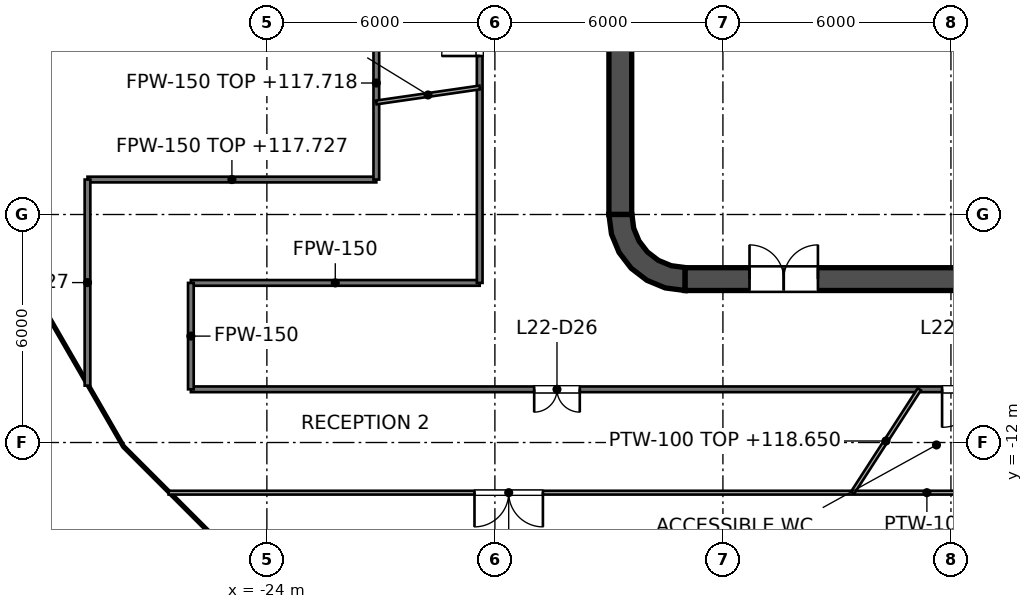
"""IFC4 building model, lengths in metres.
Left out: names, types, materials, properties, quantities, classifications, styles, units other than length and angle.
Written with IfcOpenShell. Run it as: python <this file> out.ifc"""

import sys

from ifc_helpers import new_model, si_unit, direction, frame, frame_2d, origin, place, context, subcontext, project, spatial, polyline, rectangle, outline, extrude, element, fill, save


model = new_model("IFC4")
c1 = context("Model", 3, precision=1e-05, world=origin(), true_north=direction((0.0, 1.0)))
c2 = subcontext(c1, "Body", "Model", "MODEL_VIEW")
j1 = project(units=[si_unit("LENGTHUNIT", "METRE"), si_unit("PLANEANGLEUNIT", "RADIAN")], contexts=[c1])
p1 = place(None, origin())
s1 = spatial("IfcSite", under=j1, at=p1, CompositionType="ELEMENT")
p2 = place(p1, origin())
s2 = spatial("IfcBuilding", under=s1, at=p2, CompositionType="ELEMENT")
p3 = place(p2, frame((0.0, 0.0, 114.6)))
s3 = spatial("IfcBuildingStorey", under=s2, at=p3, CompositionType="ELEMENT", Elevation=114.6)
p4 = place(p3, frame((-13.0, -7.7, 0.0), z_axis=(0.0, 0.0, 1.0), x_axis=(1.0, 0.0, 0.0)))
e1 = element("IfcWall", 1, at=p4, inside=s3, PredefinedType="SHEAR", context=c2, shape_type="SweptSolid", body=[
    extrude(rectangle(XDim=26.0, YDim=0.6, at=frame_2d((13.0, 0.0))), origin(), (0.0, 0.0, 1.0), 4.2),
])
p5 = place(p4, frame((1.7, 0.0, 0.0)))
e2 = element("IfcOpeningElement", 2, at=p5, cuts=e1, PredefinedType="OPENING", context=c2, shape_type="SweptSolid", body=[
    extrude(rectangle(XDim=1.8, YDim=2.1, at=frame_2d((0.9, 1.05))), frame((0.0, 0.3, 0.0), z_axis=(0.0, -1.0, 0.0), x_axis=(1.0, 0.0, 0.0)), (0.0, 0.0, 1.0), 0.6),
])
p6 = place(p4, frame((22.5, 0.0, 0.0)))
e3 = element("IfcOpeningElement", 3, at=p6, cuts=e1, PredefinedType="OPENING", context=c2, shape_type="SweptSolid", body=[
    extrude(rectangle(XDim=1.8, YDim=2.1, at=frame_2d((0.9, 1.05))), frame((0.0, 0.3, 0.0), z_axis=(0.0, -1.0, 0.0), x_axis=(1.0, 0.0, 0.0)), (0.0, 0.0, 1.0), 0.6),
])
p7 = place(p3, frame((-14.7, -6.0, 0.0), z_axis=(0.0, 0.0, 1.0), x_axis=(0.0, 1.0, 0.0)))
e4 = element("IfcWall", 4, at=p7, inside=s3, PredefinedType="SHEAR", context=c2, shape_type="SweptSolid", body=[
    extrude(rectangle(XDim=12.0, YDim=0.6, at=frame_2d((6.0, 0.0))), origin(), (0.0, 0.0, 1.0), 4.2),
])
p8 = place(p3, origin())
e5 = element("IfcWall", 5, at=p8, inside=s3, PredefinedType="SHEAR", context=c2, shape_type="SweptSolid", body=[
    extrude(outline(polyline([(-13.0, -8.0), (-13.0, -7.395), (-13.361, -7.347), (-13.698, -7.208), (-13.986, -6.986), (-14.208, -6.698), (-14.347, -6.361), (-14.395, -6.0), (-15.0, -6.0), (-14.932, -6.518), (-14.732, -7.0), (-14.414, -7.414), (-14.0, -7.732), (-13.518, -7.932), (-13.0, -8.0)])), origin(), (0.0, 0.0, 1.0), 4.2),
])
p9 = place(p3, frame((-9.0, -6.6, 0.0), z_axis=(0.0, 0.0, 1.0), x_axis=(0.0, 1.0, 0.0)))
e6 = element("IfcWall", 6, at=p9, inside=s3, PredefinedType="PARTITIONING", context=c2, shape_type="SweptSolid", body=[
    extrude(rectangle(XDim=2.5, YDim=0.25, at=frame_2d((1.25, 0.0))), origin(), (0.0, 0.0, 1.0), 4.05),
])
p10 = place(p9, frame((0.75, 0.0, 0.0)))
e7 = element("IfcOpeningElement", 7, at=p10, cuts=e6, PredefinedType="OPENING", context=c2, shape_type="SweptSolid", body=[
    extrude(rectangle(XDim=1.0, YDim=2.1, at=frame_2d((0.5, 1.05))), frame((0.0, 0.125, 0.0), z_axis=(0.0, -1.0, 0.0), x_axis=(1.0, 0.0, 0.0)), (0.0, 0.0, 1.0), 0.25),
])
p11 = place(p3, frame((-9.125, -7.0, 0.0), z_axis=(0.0, 0.0, 1.0), x_axis=(1.0, 0.0, 0.0)))
e8 = element("IfcWall", 8, at=p11, inside=s3, PredefinedType="SOLIDWALL", context=c2, shape_type="SweptSolid", body=[
    extrude(rectangle(XDim=18.25, YDim=0.8, at=frame_2d((9.125, 0.0))), origin(), (0.0, 0.0, 1.0), 4.05),
])
p12 = place(p3, frame((-9.125, -3.975, 0.0), z_axis=(0.0, 0.0, 1.0), x_axis=(1.0, 0.0, 0.0)))
e9 = element("IfcWall", 9, at=p12, inside=s3, PredefinedType="SOLIDWALL", context=c2, shape_type="SweptSolid", body=[
    extrude(rectangle(XDim=12.4, YDim=0.25, at=frame_2d((6.2, 0.0))), origin(), (0.0, 0.0, 1.0), 4.05),
])
p13 = place(p12, frame((1.05, 0.0, 0.0)))
e10 = element("IfcOpeningElement", 10, at=p13, cuts=e9, PredefinedType="OPENING", context=c2, shape_type="SweptSolid", body=[
    extrude(rectangle(XDim=1.2, YDim=2.1, at=frame_2d((0.6, 1.05))), frame((0.0, 0.125, 0.0), z_axis=(0.0, -1.0, 0.0), x_axis=(1.0, 0.0, 0.0)), (0.0, 0.0, 1.0), 0.25),
])
p14 = place(p12, frame((4.1, 0.0, 0.0)))
e11 = element("IfcOpeningElement", 11, at=p14, cuts=e9, PredefinedType="OPENING", context=c2, shape_type="SweptSolid", body=[
    extrude(rectangle(XDim=1.2, YDim=2.1, at=frame_2d((0.6, 1.05))), frame((0.0, 0.125, 0.0), z_axis=(0.0, -1.0, 0.0), x_axis=(1.0, 0.0, 0.0)), (0.0, 0.0, 1.0), 0.25),
])
for number, where, z_axis, x_axis in (
    (12, (-9.0, -3.85, 0.0), (0.0, 0.0, 1.0), (0.0, 1.0, 0.0)),
    (13, (-5.95, -3.85, 0.0), (0.0, 0.0, 1.0), (0.0, 1.0, 0.0)),
):
    element("IfcWall", number, at=place(p3, frame(where, z_axis=z_axis, x_axis=x_axis)), inside=s3, PredefinedType="SOLIDWALL", context=c2, shape_type="SweptSolid", body=[
        extrude(rectangle(XDim=2.2, YDim=0.25, at=frame_2d((1.1, 0.0))), origin(), (0.0, 0.0, 1.0), 4.05),
    ])
p15 = place(p3, frame((-11.8, -7.4, 0.0), z_axis=(0.0, 0.0, 1.0), x_axis=(0.0, 1.0, 0.0)))
e14 = element("IfcWall", 14, at=p15, inside=s3, PredefinedType="SOLIDWALL", context=c2, shape_type="SweptSolid", body=[
    extrude(rectangle(XDim=14.8, YDim=0.4, at=frame_2d((7.4, 0.0))), origin(), (0.0, 0.0, 1.0), 4.05),
])
p16 = place(p15, frame((11.2, 0.0, 0.0)))
e15 = element("IfcOpeningElement", 15, at=p16, cuts=e14, PredefinedType="OPENING", context=c2, shape_type="SweptSolid", body=[
    extrude(rectangle(XDim=1.1, YDim=2.1, at=frame_2d((0.55, 1.05))), frame((0.0, 0.2, 0.0), z_axis=(0.0, -1.0, 0.0), x_axis=(1.0, 0.0, 0.0)), (0.0, 0.0, 1.0), 0.4),
])
p17 = place(p15, frame((8.3, 0.0, 0.0)))
e16 = element("IfcOpeningElement", 16, at=p17, cuts=e14, PredefinedType="OPENING", context=c2, shape_type="SweptSolid", body=[
    extrude(rectangle(XDim=1.1, YDim=2.1, at=frame_2d((0.55, 1.05))), frame((0.0, 0.2, 0.0), z_axis=(0.0, -1.0, 0.0), x_axis=(1.0, 0.0, 0.0)), (0.0, 0.0, 1.0), 0.4),
])
p18 = place(p15, frame((5.4, 0.0, 0.0)))
e17 = element("IfcOpeningElement", 17, at=p18, cuts=e14, PredefinedType="OPENING", context=c2, shape_type="SweptSolid", body=[
    extrude(rectangle(XDim=1.1, YDim=2.1, at=frame_2d((0.55, 1.05))), frame((0.0, 0.2, 0.0), z_axis=(0.0, -1.0, 0.0), x_axis=(1.0, 0.0, 0.0)), (0.0, 0.0, 1.0), 0.4),
])
p19 = place(p15, frame((13.552, 0.0, 0.0)))
e18 = element("IfcOpeningElement", 18, at=p19, cuts=e14, PredefinedType="OPENING", context=c2, shape_type="SweptSolid", body=[
    extrude(rectangle(XDim=0.9, YDim=2.1, at=frame_2d((0.45, 1.05))), frame((0.0, 0.2, 0.0), z_axis=(0.0, -1.0, 0.0), x_axis=(1.0, 0.0, 0.0)), (0.0, 0.0, 1.0), 0.4),
])
p20 = place(p15, frame((0.347, 0.0, 0.0)))
e19 = element("IfcOpeningElement", 19, at=p20, cuts=e14, PredefinedType="OPENING", context=c2, shape_type="SweptSolid", body=[
    extrude(rectangle(XDim=0.9, YDim=2.1, at=frame_2d((0.45, 1.05))), frame((0.0, 0.2, 0.0), z_axis=(0.0, -1.0, 0.0), x_axis=(1.0, 0.0, 0.0)), (0.0, 0.0, 1.0), 0.4),
])
e20 = element("IfcWall", 20, at=p8, inside=s3, PredefinedType="SOLIDWALL", context=c2, shape_type="SweptSolid", body=[
    extrude(outline(polyline([(-12.0, -5.925), (-12.0, -5.675), (-14.15, -5.675), (-14.15, -3.025), (-12.0, -3.025), (-12.0, -2.775), (-14.15, -2.775), (-14.15, -0.125), (-12.0, -0.125), (-12.0, 0.125), (-14.15, 0.125), (-14.15, 2.775), (-12.0, 2.775), (-12.0, 3.025), (-14.15, 3.025), (-14.15, 5.675), (-12.0, 5.675), (-12.0, 5.925), (-14.15, 5.925), (-14.4, 5.925), (-14.4, 5.675), (-14.4, 3.025), (-14.4, 2.775), (-14.4, 0.125), (-14.4, -0.125), (-14.4, -2.775), (-14.4, -3.025), (-14.4, -5.675), (-14.4, -5.925), (-14.15, -5.925), (-12.0, -5.925)])), origin(), (0.0, 0.0, 1.0), 4.05),
])
p21 = place(p3, frame((-26.0, -10.6, 0.0), z_axis=(0.0, 0.0, 1.0), x_axis=(1.0, 0.0, 0.0)))
e21 = element("IfcWall", 21, at=p21, inside=s3, PredefinedType="PARTITIONING", context=c2, shape_type="SweptSolid", body=[
    extrude(rectangle(XDim=52.0, YDim=0.15, at=frame_2d((26.0, 0.0))), origin(), (0.0, 0.0, 1.0), 3.127),
])
p22 = place(p21, frame((9.034, 0.0, 0.0)))
e22 = element("IfcOpeningElement", 22, at=p22, cuts=e21, PredefinedType="OPENING", context=c2, shape_type="SweptSolid", body=[
    extrude(rectangle(XDim=1.2, YDim=2.1, at=frame_2d((0.6, 1.05))), frame((0.0, 0.075, 0.0), z_axis=(0.0, -1.0, 0.0), x_axis=(1.0, 0.0, 0.0)), (0.0, 0.0, 1.0), 0.15),
])
p23 = place(p21, frame((19.767, 0.0, 0.0)))
e23 = element("IfcOpeningElement", 23, at=p23, cuts=e21, PredefinedType="OPENING", context=c2, shape_type="SweptSolid", body=[
    extrude(rectangle(XDim=1.0, YDim=2.1, at=frame_2d((0.5, 1.05))), frame((0.0, 0.075, 0.0), z_axis=(0.0, -1.0, 0.0), x_axis=(1.0, 0.0, 0.0)), (0.0, 0.0, 1.0), 0.15),
])
p24 = place(p21, frame((21.763, 0.0, 0.0)))
e24 = element("IfcOpeningElement", 24, at=p24, cuts=e21, PredefinedType="OPENING", context=c2, shape_type="SweptSolid", body=[
    extrude(rectangle(XDim=1.0, YDim=2.1, at=frame_2d((0.5, 1.05))), frame((0.0, 0.075, 0.0), z_axis=(0.0, -1.0, 0.0), x_axis=(1.0, 0.0, 0.0)), (0.0, 0.0, 1.0), 0.15),
])
p25 = place(p21, frame((29.38, 0.0, 0.0)))
e25 = element("IfcOpeningElement", 25, at=p25, cuts=e21, PredefinedType="OPENING", context=c2, shape_type="SweptSolid", body=[
    extrude(rectangle(XDim=1.0, YDim=2.1, at=frame_2d((0.5, 1.05))), frame((0.0, 0.075, 0.0), z_axis=(0.0, -1.0, 0.0), x_axis=(1.0, 0.0, 0.0)), (0.0, 0.0, 1.0), 0.15),
])
p26 = place(p21, frame((41.202, 0.0, 0.0)))
e26 = element("IfcOpeningElement", 26, at=p26, cuts=e21, PredefinedType="OPENING", context=c2, shape_type="SweptSolid", body=[
    extrude(rectangle(XDim=1.0, YDim=2.1, at=frame_2d((0.5, 1.05))), frame((0.0, 0.075, 0.0), z_axis=(0.0, -1.0, 0.0), x_axis=(1.0, 0.0, 0.0)), (0.0, 0.0, 1.0), 0.15),
])
p27 = place(p3, frame((-26.0, -7.8, 0.0), z_axis=(0.0, 0.0, 1.0), x_axis=(1.0, 0.0, 0.0)))
e27 = element("IfcWall", 27, at=p27, inside=s3, PredefinedType="PARTITIONING", context=c2, shape_type="SweptSolid", body=[
    extrude(rectangle(XDim=7.6, YDim=0.15, at=frame_2d((3.8, 0.0))), origin(), (0.0, 0.0, 1.0), 3.276),
])
p28 = place(p3, frame((-28.72, -5.08, 0.0), z_axis=(0.0, 0.0, 1.0), x_axis=(1.0, 0.0, 0.0)))
e28 = element("IfcWall", 28, at=p28, inside=s3, PredefinedType="PARTITIONING", context=c2, shape_type="SweptSolid", body=[
    extrude(rectangle(XDim=7.6, YDim=0.15, at=frame_2d((3.8, 0.0))), origin(), (0.0, 0.0, 1.0), 3.127),
])
p29 = place(p3, frame((-6.359, -23.732, 0.0), z_axis=(0.0, 0.0, 1.0), x_axis=(0.258844995685, 0.965918872478, 0.0)))
e29 = element("IfcWall", 29, at=p29, inside=s3, PredefinedType="PARTITIONING", context=c2, shape_type="SweptSolid", body=[
    extrude(rectangle(XDim=13.595, YDim=0.15, at=frame_2d((6.798, 0.0))), origin(), (0.0, 0.0, 1.0), 3.502),
])
p30 = place(p3, frame((-18.4, -7.8, 0.0), z_axis=(0.0, 0.0, 1.0), x_axis=(0.0, 1.0, 0.0)))
e30 = element("IfcWall", 30, at=p30, inside=s3, PredefinedType="PARTITIONING", context=c2, shape_type="SweptSolid", body=[
    extrude(rectangle(XDim=15.6, YDim=0.15, at=frame_2d((7.8, 0.0))), origin(), (0.0, 0.0, 1.0), 3.118),
])
p31 = place(p30, frame((5.971, 0.0, 0.0)))
e31 = element("IfcOpeningElement", 31, at=p31, cuts=e30, PredefinedType="OPENING", context=c2, shape_type="SweptSolid", body=[
    extrude(rectangle(XDim=1.0, YDim=2.1, at=frame_2d((0.5, 1.05))), frame((0.0, 0.075, 0.0), z_axis=(0.0, -1.0, 0.0), x_axis=(1.0, 0.0, 0.0)), (0.0, 0.0, 1.0), 0.15),
])
p32 = place(p3, frame((-21.12, -5.08, 0.0), z_axis=(0.0, 0.0, 1.0), x_axis=(0.0, 1.0, 0.0)))
e32 = element("IfcWall", 32, at=p32, inside=s3, PredefinedType="PARTITIONING", context=c2, shape_type="SweptSolid", body=[
    extrude(rectangle(XDim=5.08, YDim=0.15, at=frame_2d((2.54, 0.0))), origin(), (0.0, 0.0, 1.0), 3.118),
])
p33 = place(p3, frame((-26.0, -10.6, 0.0), z_axis=(0.0, 0.0, 1.0), x_axis=(0.0, 1.0, 0.0)))
e33 = element("IfcWall", 33, at=p33, inside=s3, PredefinedType="PARTITIONING", context=c2, shape_type="SweptSolid", body=[
    extrude(rectangle(XDim=2.8, YDim=0.15, at=frame_2d((1.4, 0.0))), origin(), (0.0, 0.0, 1.0), 3.276),
])
p34 = place(p3, frame((-28.72, -10.503, 0.0), z_axis=(0.0, 0.0, 1.0), x_axis=(0.0, 1.0, 0.0)))
e34 = element("IfcWall", 34, at=p34, inside=s3, PredefinedType="PARTITIONING", context=c2, shape_type="SweptSolid", body=[
    extrude(rectangle(XDim=5.423, YDim=0.15, at=frame_2d((2.711, 0.0))), origin(), (0.0, 0.0, 1.0), 3.127),
])
p35 = place(p3, frame((-26.586, -13.32, 0.0), z_axis=(0.0, 0.0, 1.0), x_axis=(1.0, 0.0, 0.0)))
e35 = element("IfcWall", 35, at=p35, inside=s3, PredefinedType="PARTITIONING", context=c2, shape_type="SweptSolid", body=[
    extrude(rectangle(XDim=39.906, YDim=0.1, at=frame_2d((19.953, 0.0))), origin(), (0.0, 0.0, 1.0), 3.127),
])
p36 = place(p35, frame((8.049, 0.0, 0.0)))
e36 = element("IfcOpeningElement", 36, at=p36, cuts=e35, PredefinedType="OPENING", context=c2, shape_type="SweptSolid", body=[
    extrude(rectangle(XDim=1.8, YDim=2.1, at=frame_2d((0.9, 1.05))), frame((0.0, 0.05, 0.0), z_axis=(0.0, -1.0, 0.0), x_axis=(1.0, 0.0, 0.0)), (0.0, 0.0, 1.0), 0.1),
])
p37 = place(p35, frame((30.562, 0.0, 0.0)))
e37 = element("IfcOpeningElement", 37, at=p37, cuts=e35, PredefinedType="OPENING", context=c2, shape_type="SweptSolid", body=[
    extrude(rectangle(XDim=1.8, YDim=2.1, at=frame_2d((0.9, 1.05))), frame((0.0, 0.05, 0.0), z_axis=(0.0, -1.0, 0.0), x_axis=(1.0, 0.0, 0.0)), (0.0, 0.0, 1.0), 0.1),
])
p38 = place(p3, frame((-21.12, -3.051, 0.0), z_axis=(0.0, 0.0, 1.0), x_axis=(0.989720814385, 0.143012969948, 0.0)))
e38 = element("IfcWall", 38, at=p38, inside=s3, PredefinedType="PARTITIONING", context=c2, shape_type="SweptSolid", body=[
    extrude(rectangle(XDim=2.749, YDim=0.1, at=frame_2d((1.374, 0.0))), origin(), (0.0, 0.0, 1.0), 3.195),
])
p39 = place(p3, frame((-8.587, -13.32, 0.0), z_axis=(0.0, 0.0, 1.0), x_axis=(0.54192754119, 0.840425213865, 0.0)))
e39 = element("IfcWall", 39, at=p39, inside=s3, PredefinedType="PARTITIONING", context=c2, shape_type="SweptSolid", body=[
    extrude(rectangle(XDim=3.236, YDim=0.1, at=frame_2d((1.618, 0.0))), origin(), (0.0, 0.0, 1.0), 4.05),
])
p40 = place(p18, origin())
e40 = element("IfcDoor", 40, at=p40, inside=s3, OperationType="DOUBLE_DOOR_SLIDING", PredefinedType="DOOR", context=c2, shape_type="SweptSolid", body=[
    extrude(rectangle(XDim=1.1, YDim=2.1, at=frame_2d((0.55, 1.05))), frame((0.0, 0.025, 0.0), z_axis=(0.0, -1.0, 0.0), x_axis=(1.0, 0.0, 0.0)), (0.0, 0.0, 1.0), 0.05),
])
fill(e17, e40)
p41 = place(p13, origin())
e41 = element("IfcDoor", 41, at=p41, inside=s3, OperationType="DOUBLE_DOOR_SLIDING", PredefinedType="DOOR", context=c2, shape_type="SweptSolid", body=[
    extrude(rectangle(XDim=1.2, YDim=2.1, at=frame_2d((0.6, 1.05))), frame((0.0, 0.025, 0.0), z_axis=(0.0, -1.0, 0.0), x_axis=(1.0, 0.0, 0.0)), (0.0, 0.0, 1.0), 0.05),
])
fill(e10, e41)
p42 = place(p10, origin())
e42 = element("IfcDoor", 42, at=p42, inside=s3, OperationType="SINGLE_SWING_LEFT", PredefinedType="DOOR", context=c2, shape_type="SweptSolid", body=[
    extrude(rectangle(XDim=1.0, YDim=2.1, at=frame_2d((0.5, 1.05))), frame((0.0, 0.025, 0.0), z_axis=(0.0, -1.0, 0.0), x_axis=(1.0, 0.0, 0.0)), (0.0, 0.0, 1.0), 0.05),
])
fill(e7, e42)
p43 = place(p20, origin())
e43 = element("IfcDoor", 43, at=p43, inside=s3, OperationType="SINGLE_SWING_LEFT", PredefinedType="DOOR", context=c2, shape_type="SweptSolid", body=[
    extrude(rectangle(XDim=0.9, YDim=2.1, at=frame_2d((0.45, 1.05))), frame((0.0, 0.025, 0.0), z_axis=(0.0, -1.0, 0.0), x_axis=(1.0, 0.0, 0.0)), (0.0, 0.0, 1.0), 0.05),
])
fill(e19, e43)
p44 = place(p5, origin())
e44 = element("IfcDoor", 44, at=p44, inside=s3, OperationType="DOUBLE_DOOR_SINGLE_SWING", PredefinedType="DOOR", context=c2, shape_type="SweptSolid", body=[
    extrude(rectangle(XDim=1.8, YDim=2.1, at=frame_2d((0.9, 1.05))), frame((0.0, 0.025, 0.0), z_axis=(0.0, -1.0, 0.0), x_axis=(1.0, 0.0, 0.0)), (0.0, 0.0, 1.0), 0.05),
])
fill(e2, e44)
p45 = place(p31, origin())
e45 = element("IfcDoor", 45, at=p45, inside=s3, OperationType="SINGLE_SWING_LEFT", PredefinedType="DOOR", context=c2, shape_type="SweptSolid", body=[
    extrude(rectangle(XDim=1.0, YDim=2.1, at=frame_2d((0.5, 1.05))), frame((0.0, 0.025, 0.0), z_axis=(0.0, -1.0, 0.0), x_axis=(1.0, 0.0, 0.0)), (0.0, 0.0, 1.0), 0.05),
])
fill(e31, e45)
p46 = place(p22, origin())
e46 = element("IfcDoor", 46, at=p46, inside=s3, OperationType="DOUBLE_DOOR_SINGLE_SWING", PredefinedType="DOOR", context=c2, shape_type="SweptSolid", body=[
    extrude(rectangle(XDim=1.2, YDim=2.1, at=frame_2d((0.6, 1.05))), frame((0.0, 0.025, 0.0), z_axis=(0.0, -1.0, 0.0), x_axis=(1.0, 0.0, 0.0)), (0.0, 0.0, 1.0), 0.05),
])
fill(e22, e46)
p47 = place(p23, origin())
e47 = element("IfcDoor", 47, at=p47, inside=s3, OperationType="SINGLE_SWING_LEFT", PredefinedType="DOOR", context=c2, shape_type="SweptSolid", body=[
    extrude(rectangle(XDim=1.0, YDim=2.1, at=frame_2d((0.5, 1.05))), frame((0.0, 0.025, 0.0), z_axis=(0.0, -1.0, 0.0), x_axis=(1.0, 0.0, 0.0)), (0.0, 0.0, 1.0), 0.05),
])
fill(e23, e47)
p48 = place(p36, origin())
e48 = element("IfcDoor", 48, at=p48, inside=s3, OperationType="DOUBLE_DOOR_SINGLE_SWING", PredefinedType="DOOR", context=c2, shape_type="SweptSolid", body=[
    extrude(rectangle(XDim=1.8, YDim=2.1, at=frame_2d((0.9, 1.05))), frame((0.0, 0.025, 0.0), z_axis=(0.0, -1.0, 0.0), x_axis=(1.0, 0.0, 0.0)), (0.0, 0.0, 1.0), 0.05),
])
fill(e36, e48)
save(model, sys.argv[1])
